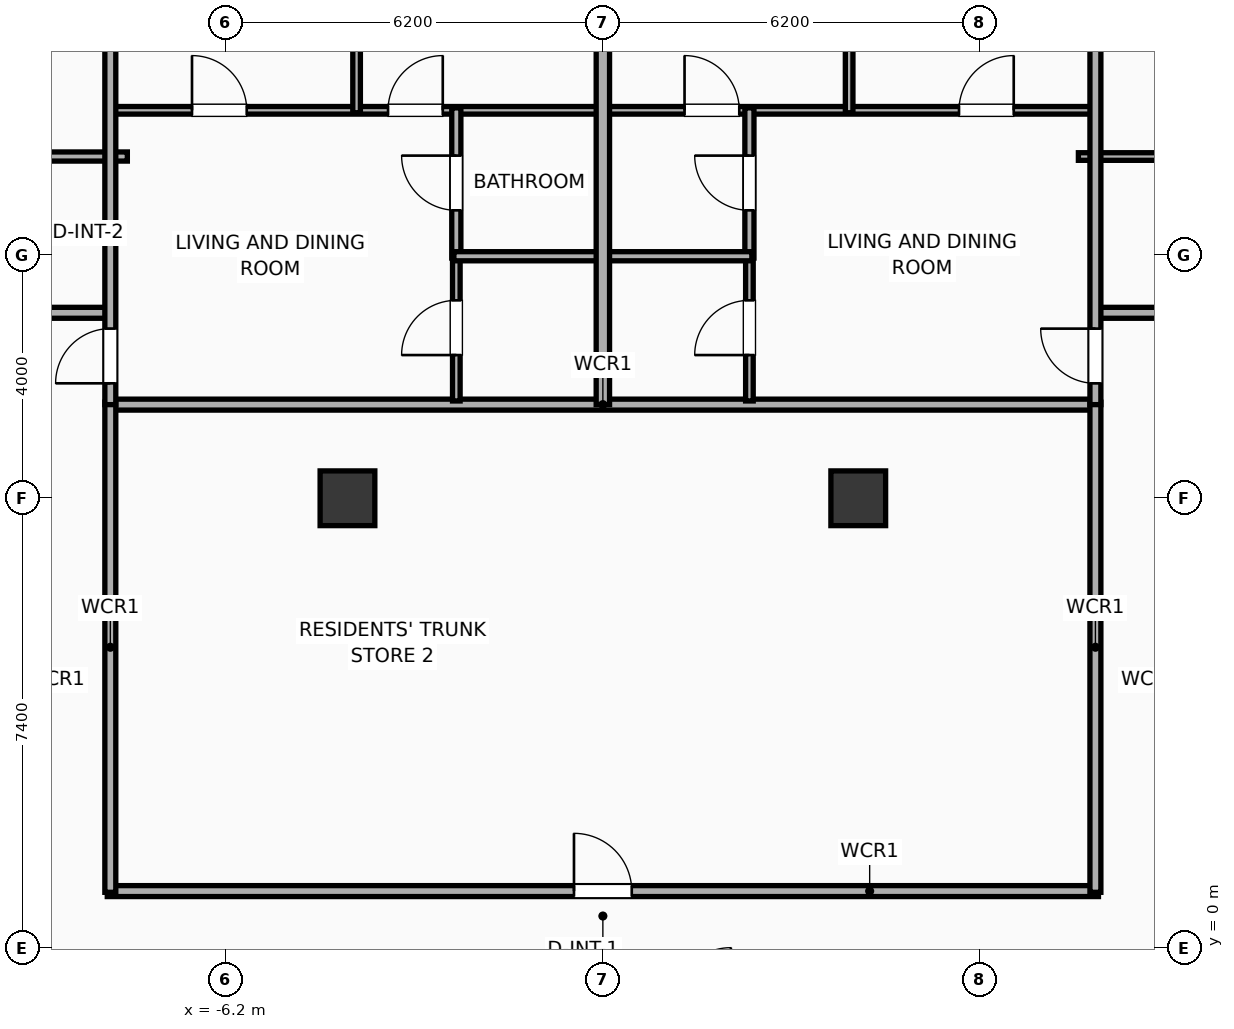
"""IFC4 building model, lengths in metres.
Left out: names, types, materials, properties, quantities, classifications, styles, units other than length and angle.
Written with IfcOpenShell. Run it as: python <this file> out.ifc"""

import sys

from ifc_helpers import new_model, si_unit, direction, frame, frame_2d, origin, origin_2d, place, context, subcontext, project, spatial, rectangle, extrude, element, fill, save


model = new_model("IFC4")
c1 = context("Model", 3, precision=1e-05, world=origin(), true_north=direction((0.0, 1.0)))
c2 = subcontext(c1, "Body", "Model", "MODEL_VIEW")
j1 = project(units=[si_unit("LENGTHUNIT", "METRE"), si_unit("PLANEANGLEUNIT", "RADIAN")], contexts=[c1])
p1 = place(None, origin())
s1 = spatial("IfcSite", under=j1, at=p1, CompositionType="ELEMENT")
p2 = place(p1, origin())
s2 = spatial("IfcBuilding", under=s1, at=p2, CompositionType="ELEMENT")
p3 = place(p2, frame((0.0, 0.0, 163.8)))
s3 = spatial("IfcBuildingStorey", under=s2, at=p3, CompositionType="ELEMENT", Elevation=163.8)
for number, where, z_axis, x_axis in (
    (1, (-4.2, 7.4, 0.0), (0.0, 0.0, 1.0), (1.0, 0.0, 0.0)),
    (2, (4.2, 7.4, 0.0), (0.0, 0.0, 1.0), (1.0, 0.0, 0.0)),
):
    element("IfcColumn", number, at=place(p3, frame(where, z_axis=z_axis, x_axis=x_axis)), inside=s3, PredefinedType="COLUMN", context=c2, shape_type="SweptSolid", body=[
        extrude(rectangle(XDim=0.9, YDim=0.9, at=origin_2d()), origin(), (0.0, 0.0, 1.0), 3.9),
    ])
p4 = place(p3, frame((-8.15, 8.94, 0.0), z_axis=(0.0, 0.0, 1.0), x_axis=(1.0, 0.0, 0.0)))
e3 = element("IfcWall", 3, at=p4, inside=s3, PredefinedType="PARTITIONING", context=c2, shape_type="SweptSolid", body=[
    extrude(rectangle(XDim=16.3, YDim=0.18, at=frame_2d((8.15, 0.0))), origin(), (0.0, 0.0, 1.0), 3.65),
])
p5 = place(p3, frame((-8.15, 0.94, 0.0), z_axis=(0.0, 0.0, 1.0), x_axis=(1.0, 0.0, 0.0)))
e4 = element("IfcWall", 4, at=p5, inside=s3, PredefinedType="PARTITIONING", context=c2, shape_type="SweptSolid", body=[
    extrude(rectangle(XDim=16.3, YDim=0.18, at=frame_2d((8.15, 0.0))), origin(), (0.0, 0.0, 1.0), 3.65),
])
p6 = place(p5, frame((7.675, 0.0, 0.0)))
e5 = element("IfcOpeningElement", 5, at=p6, cuts=e4, PredefinedType="OPENING", context=c2, shape_type="SweptSolid", body=[
    extrude(rectangle(XDim=0.95, YDim=2.05, at=frame_2d((0.475, 1.025))), frame((0.0, 0.1, 0.0), z_axis=(0.0, -1.0, 0.0), x_axis=(1.0, 0.0, 0.0)), (0.0, 0.0, 1.0), 0.2),
])
for number, where, z_axis, x_axis in (
    (6, (-8.1, 0.92, 0.0), (0.0, 0.0, 1.0), (0.0, 1.0, 0.0)),
    (7, (8.1, 0.92, 0.0), (0.0, 0.0, 1.0), (0.0, 1.0, 0.0)),
):
    element("IfcWall", number, at=place(p3, frame(where, z_axis=z_axis, x_axis=x_axis)), inside=s3, PredefinedType="PARTITIONING", context=c2, shape_type="SweptSolid", body=[
        extrude(rectangle(XDim=8.06, YDim=0.18, at=frame_2d((4.03, 0.0))), origin(), (0.0, 0.0, 1.0), 3.65),
    ])
p7 = place(p3, frame((-10.126, 13.02, 0.0), z_axis=(0.0, 0.0, 1.0), x_axis=(1.0, 0.0, 0.0)))
e8 = element("IfcWall", 8, at=p7, inside=s3, PredefinedType="PLUMBINGWALL", context=c2, shape_type="SweptSolid", body=[
    extrude(rectangle(XDim=2.306, YDim=0.15, at=frame_2d((1.153, 0.0))), origin(), (0.0, 0.0, 1.0), 3.65),
])
p8 = place(p3, frame((7.82, 13.02, 0.0), z_axis=(0.0, 0.0, 1.0), x_axis=(1.0, 0.0, 0.0)))
e9 = element("IfcWall", 9, at=p8, inside=s3, PredefinedType="PARTITIONING", context=c2, shape_type="SweptSolid", body=[
    extrude(rectangle(XDim=2.63, YDim=0.125, at=frame_2d((1.315, 0.0))), origin(), (0.0, 0.0, 1.0), 3.65),
])
p9 = place(p3, frame((-19.75, 10.45, 0.0), z_axis=(0.0, 0.0, 1.0), x_axis=(1.0, 0.0, 0.0)))
e10 = element("IfcWall", 10, at=p9, inside=s3, PredefinedType="PARTITIONING", context=c2, shape_type="SweptSolid", body=[
    extrude(rectangle(XDim=11.67, YDim=0.18, at=frame_2d((5.835, 0.0))), origin(), (0.0, 0.0, 1.0), 3.65),
])
p10 = place(p9, frame((3.553, 0.0, 0.0)))
e11 = element("IfcOpeningElement", 11, at=p10, cuts=e10, PredefinedType="OPENING", context=c2, shape_type="SweptSolid", body=[
    extrude(rectangle(XDim=1.15, YDim=2.05, at=frame_2d((0.575, 1.025))), frame((0.0, 0.1, 0.0), z_axis=(0.0, -1.0, 0.0), x_axis=(1.0, 0.0, 0.0)), (0.0, 0.0, 1.0), 0.2),
])
p11 = place(p9, frame((8.489, 0.0, 0.0)))
e12 = element("IfcOpeningElement", 12, at=p11, cuts=e10, PredefinedType="OPENING", context=c2, shape_type="SweptSolid", body=[
    extrude(rectangle(XDim=0.9, YDim=2.05, at=frame_2d((0.45, 1.025))), frame((0.0, 0.1, 0.0), z_axis=(0.0, -1.0, 0.0), x_axis=(1.0, 0.0, 0.0)), (0.0, 0.0, 1.0), 0.2),
])
p12 = place(p3, frame((8.08, 10.45, 0.0), z_axis=(0.0, 0.0, 1.0), x_axis=(1.0, 0.0, 0.0)))
e13 = element("IfcWall", 13, at=p12, inside=s3, PredefinedType="PARTITIONING", context=c2, shape_type="SweptSolid", body=[
    extrude(rectangle(XDim=11.67, YDim=0.18, at=frame_2d((5.835, 0.0))), origin(), (0.0, 0.0, 1.0), 3.65),
])
p13 = place(p12, frame((2.604, 0.0, 0.0)))
e14 = element("IfcOpeningElement", 14, at=p13, cuts=e13, PredefinedType="OPENING", context=c2, shape_type="SweptSolid", body=[
    extrude(rectangle(XDim=0.9, YDim=2.05, at=frame_2d((0.45, 1.025))), frame((0.0, 0.1, 0.0), z_axis=(0.0, -1.0, 0.0), x_axis=(1.0, 0.0, 0.0)), (0.0, 0.0, 1.0), 0.2),
])
p14 = place(p12, frame((7.016, 0.0, 0.0)))
e15 = element("IfcOpeningElement", 15, at=p14, cuts=e13, PredefinedType="OPENING", context=c2, shape_type="SweptSolid", body=[
    extrude(rectangle(XDim=1.15, YDim=2.05, at=frame_2d((0.575, 1.025))), frame((0.0, 0.1, 0.0), z_axis=(0.0, -1.0, 0.0), x_axis=(1.0, 0.0, 0.0)), (0.0, 0.0, 1.0), 0.2),
])
p15 = place(p3, frame((-8.08, 13.78, 0.0), z_axis=(0.0, 0.0, 1.0), x_axis=(1.0, 0.0, 0.0)))
e16 = element("IfcWall", 16, at=p15, inside=s3, PredefinedType="PARTITIONING", context=c2, shape_type="SweptSolid", body=[
    extrude(rectangle(XDim=8.06, YDim=0.125, at=frame_2d((4.03, 0.0))), origin(), (0.0, 0.0, 1.0), 3.65),
])
p16 = place(p15, frame((1.323, 0.0, 0.0)))
e17 = element("IfcOpeningElement", 17, at=p16, cuts=e16, PredefinedType="OPENING", context=c2, shape_type="SweptSolid", body=[
    extrude(rectangle(XDim=0.9, YDim=2.05, at=frame_2d((0.45, 1.025))), frame((0.0, 0.073, 0.0), z_axis=(0.0, -1.0, 0.0), x_axis=(1.0, 0.0, 0.0)), (0.0, 0.0, 1.0), 0.145),
])
p17 = place(p15, frame((4.547, 0.0, 0.0)))
e18 = element("IfcOpeningElement", 18, at=p17, cuts=e16, PredefinedType="OPENING", context=c2, shape_type="SweptSolid", body=[
    extrude(rectangle(XDim=0.9, YDim=2.05, at=frame_2d((0.45, 1.025))), frame((0.0, 0.073, 0.0), z_axis=(0.0, -1.0, 0.0), x_axis=(1.0, 0.0, 0.0)), (0.0, 0.0, 1.0), 0.145),
])
p18 = place(p3, frame((-2.41, 9.0, 0.0), z_axis=(0.0, 0.0, 1.0), x_axis=(0.0, 1.0, 0.0)))
e19 = element("IfcWall", 19, at=p18, inside=s3, PredefinedType="PARTITIONING", context=c2, shape_type="SweptSolid", body=[
    extrude(rectangle(XDim=2.41, YDim=0.125, at=frame_2d((1.205, 0.0))), origin(), (0.0, 0.0, 1.0), 3.65),
])
p19 = place(p18, frame((0.755, 0.0, 0.0)))
e20 = element("IfcOpeningElement", 20, at=p19, cuts=e19, PredefinedType="OPENING", context=c2, shape_type="SweptSolid", body=[
    extrude(rectangle(XDim=0.9, YDim=2.05, at=frame_2d((0.45, 1.025))), frame((0.0, 0.073, 0.0), z_axis=(0.0, -1.0, 0.0), x_axis=(1.0, 0.0, 0.0)), (0.0, 0.0, 1.0), 0.145),
])
p20 = place(p3, frame((-2.41, 11.35, 0.0), z_axis=(0.0, 0.0, 1.0), x_axis=(0.0, 1.0, 0.0)))
e21 = element("IfcWall", 21, at=p20, inside=s3, PredefinedType="PLUMBINGWALL", context=c2, shape_type="SweptSolid", body=[
    extrude(rectangle(XDim=2.47, YDim=0.15, at=frame_2d((1.235, 0.0))), origin(), (0.0, 0.0, 1.0), 3.04),
])
p21 = place(p20, frame((0.785, 0.0, 0.0)))
e22 = element("IfcOpeningElement", 22, at=p21, cuts=e21, PredefinedType="OPENING", context=c2, shape_type="SweptSolid", body=[
    extrude(rectangle(XDim=0.9, YDim=2.05, at=frame_2d((0.45, 1.025))), frame((0.0, 0.085, 0.0), z_axis=(0.0, -1.0, 0.0), x_axis=(1.0, 0.0, 0.0)), (0.0, 0.0, 1.0), 0.17),
])
p22 = place(p3, frame((-2.45, 11.38, 0.0), z_axis=(0.0, 0.0, 1.0), x_axis=(1.0, 0.0, 0.0)))
e23 = element("IfcWall", 23, at=p22, inside=s3, PredefinedType="PLUMBINGWALL", context=c2, shape_type="SweptSolid", body=[
    extrude(rectangle(XDim=2.43, YDim=0.15, at=frame_2d((1.215, 0.0))), origin(), (0.0, 0.0, 1.0), 3.65),
])
p23 = place(p3, frame((-4.05, 13.74, 0.0), z_axis=(0.0, 0.0, 1.0), x_axis=(0.0, 1.0, 0.0)))
e24 = element("IfcWall", 24, at=p23, inside=s3, PredefinedType="PARTITIONING", context=c2, shape_type="SweptSolid", body=[
    extrude(rectangle(XDim=5.912, YDim=0.125, at=frame_2d((2.956, 0.0))), origin(), (0.0, 0.0, 1.0), 3.65),
])
p24 = place(p3, frame((-8.1, 8.94, 0.0), z_axis=(0.0, 0.0, 1.0), x_axis=(0.0, 1.0, 0.0)))
e25 = element("IfcWall", 25, at=p24, inside=s3, PredefinedType="PARTITIONING", context=c2, shape_type="SweptSolid", body=[
    extrude(rectangle(XDim=10.286, YDim=0.18, at=frame_2d((5.143, 0.0))), origin(), (0.0, 0.0, 1.0), 3.65),
])
p25 = place(p24, frame((0.35, 0.0, 0.0)))
e26 = element("IfcOpeningElement", 26, at=p25, cuts=e25, PredefinedType="OPENING", context=c2, shape_type="SweptSolid", body=[
    extrude(rectangle(XDim=0.9, YDim=2.05, at=frame_2d((0.45, 1.025))), frame((0.0, 0.1, 0.0), z_axis=(0.0, -1.0, 0.0), x_axis=(1.0, 0.0, 0.0)), (0.0, 0.0, 1.0), 0.2),
])
p26 = place(p3, frame((0.02, 13.78, 0.0), z_axis=(0.0, 0.0, 1.0), x_axis=(1.0, 0.0, 0.0)))
e27 = element("IfcWall", 27, at=p26, inside=s3, PredefinedType="PARTITIONING", context=c2, shape_type="SweptSolid", body=[
    extrude(rectangle(XDim=8.06, YDim=0.125, at=frame_2d((4.03, 0.0))), origin(), (0.0, 0.0, 1.0), 3.65),
])
p27 = place(p26, frame((1.323, 0.0, 0.0)))
e28 = element("IfcOpeningElement", 28, at=p27, cuts=e27, PredefinedType="OPENING", context=c2, shape_type="SweptSolid", body=[
    extrude(rectangle(XDim=0.9, YDim=2.05, at=frame_2d((0.45, 1.025))), frame((0.0, 0.073, 0.0), z_axis=(0.0, -1.0, 0.0), x_axis=(1.0, 0.0, 0.0)), (0.0, 0.0, 1.0), 0.145),
])
p28 = place(p26, frame((5.837, 0.0, 0.0)))
e29 = element("IfcOpeningElement", 29, at=p28, cuts=e27, PredefinedType="OPENING", context=c2, shape_type="SweptSolid", body=[
    extrude(rectangle(XDim=0.9, YDim=2.05, at=frame_2d((0.45, 1.025))), frame((0.0, 0.073, 0.0), z_axis=(0.0, -1.0, 0.0), x_axis=(1.0, 0.0, 0.0)), (0.0, 0.0, 1.0), 0.145),
])
p29 = place(p3, frame((2.41, 9.0, 0.0), z_axis=(0.0, 0.0, 1.0), x_axis=(0.0, 1.0, 0.0)))
e30 = element("IfcWall", 30, at=p29, inside=s3, PredefinedType="PARTITIONING", context=c2, shape_type="SweptSolid", body=[
    extrude(rectangle(XDim=2.41, YDim=0.125, at=frame_2d((1.205, 0.0))), origin(), (0.0, 0.0, 1.0), 3.65),
])
p30 = place(p29, frame((0.755, 0.0, 0.0)))
e31 = element("IfcOpeningElement", 31, at=p30, cuts=e30, PredefinedType="OPENING", context=c2, shape_type="SweptSolid", body=[
    extrude(rectangle(XDim=0.9, YDim=2.05, at=frame_2d((0.45, 1.025))), frame((0.0, 0.073, 0.0), z_axis=(0.0, -1.0, 0.0), x_axis=(1.0, 0.0, 0.0)), (0.0, 0.0, 1.0), 0.145),
])
p31 = place(p3, frame((2.41, 11.35, 0.0), z_axis=(0.0, 0.0, 1.0), x_axis=(0.0, 1.0, 0.0)))
e32 = element("IfcWall", 32, at=p31, inside=s3, PredefinedType="PLUMBINGWALL", context=c2, shape_type="SweptSolid", body=[
    extrude(rectangle(XDim=2.47, YDim=0.15, at=frame_2d((1.235, 0.0))), origin(), (0.0, 0.0, 1.0), 3.65),
])
p32 = place(p31, frame((0.785, 0.0, 0.0)))
e33 = element("IfcOpeningElement", 33, at=p32, cuts=e32, PredefinedType="OPENING", context=c2, shape_type="SweptSolid", body=[
    extrude(rectangle(XDim=0.9, YDim=2.05, at=frame_2d((0.45, 1.025))), frame((0.0, 0.085, 0.0), z_axis=(0.0, -1.0, 0.0), x_axis=(1.0, 0.0, 0.0)), (0.0, 0.0, 1.0), 0.17),
])
p33 = place(p3, frame((0.02, 11.38, 0.0), z_axis=(0.0, 0.0, 1.0), x_axis=(1.0, 0.0, 0.0)))
e34 = element("IfcWall", 34, at=p33, inside=s3, PredefinedType="PLUMBINGWALL", context=c2, shape_type="SweptSolid", body=[
    extrude(rectangle(XDim=2.43, YDim=0.15, at=frame_2d((1.215, 0.0))), origin(), (0.0, 0.0, 1.0), 3.65),
])
p34 = place(p3, frame((4.05, 13.74, 0.0), z_axis=(0.0, 0.0, 1.0), x_axis=(0.0, 1.0, 0.0)))
e35 = element("IfcWall", 35, at=p34, inside=s3, PredefinedType="PARTITIONING", context=c2, shape_type="SweptSolid", body=[
    extrude(rectangle(XDim=6.763, YDim=0.125, at=frame_2d((3.382, 0.0))), origin(), (0.0, 0.0, 1.0), 3.65),
])
p35 = place(p3, frame((8.1, 8.94, 0.0), z_axis=(0.0, 0.0, 1.0), x_axis=(0.0, 1.0, 0.0)))
e36 = element("IfcWall", 36, at=p35, inside=s3, PredefinedType="PARTITIONING", context=c2, shape_type="SweptSolid", body=[
    extrude(rectangle(XDim=11.989, YDim=0.18, at=frame_2d((5.995, 0.0))), origin(), (0.0, 0.0, 1.0), 3.65),
])
p36 = place(p35, frame((0.35, 0.0, 0.0)))
e37 = element("IfcOpeningElement", 37, at=p36, cuts=e36, PredefinedType="OPENING", context=c2, shape_type="SweptSolid", body=[
    extrude(rectangle(XDim=0.9, YDim=2.05, at=frame_2d((0.45, 1.025))), frame((0.0, 0.1, 0.0), z_axis=(0.0, -1.0, 0.0), x_axis=(1.0, 0.0, 0.0)), (0.0, 0.0, 1.0), 0.2),
])
p37 = place(p3, frame((0.0, 8.94, 0.0), z_axis=(0.0, 0.0, 1.0), x_axis=(0.0, 1.0, 0.0)))
e38 = element("IfcWall", 38, at=p37, inside=s3, PredefinedType="PARTITIONING", context=c2, shape_type="SweptSolid", body=[
    extrude(rectangle(XDim=11.138, YDim=0.22, at=frame_2d((5.569, 0.0))), origin(), (0.0, 0.0, 1.0), 3.04),
])
p38 = place(p6, origin())
e39 = element("IfcDoor", 39, at=p38, inside=s3, OperationType="SINGLE_SWING_LEFT", PredefinedType="DOOR", context=c2, shape_type="SweptSolid", body=[
    extrude(rectangle(XDim=0.95, YDim=2.05, at=frame_2d((0.475, 1.025))), frame((0.0, 0.025, 0.0), z_axis=(0.0, -1.0, 0.0), x_axis=(1.0, 0.0, 0.0)), (0.0, 0.0, 1.0), 0.05),
])
fill(e5, e39)
p39 = place(p16, origin())
e40 = element("IfcDoor", 40, at=p39, inside=s3, OperationType="SINGLE_SWING_LEFT", PredefinedType="DOOR", context=c2, shape_type="SweptSolid", body=[
    extrude(rectangle(XDim=0.9, YDim=2.05, at=frame_2d((0.45, 1.025))), frame((0.0, 0.025, 0.0), z_axis=(0.0, -1.0, 0.0), x_axis=(1.0, 0.0, 0.0)), (0.0, 0.0, 1.0), 0.05),
])
fill(e17, e40)
p40 = place(p17, origin())
e41 = element("IfcDoor", 41, at=p40, inside=s3, OperationType="SINGLE_SWING_RIGHT", PredefinedType="DOOR", context=c2, shape_type="SweptSolid", body=[
    extrude(rectangle(XDim=0.9, YDim=2.05, at=frame_2d((0.45, 1.025))), frame((0.0, 0.025, 0.0), z_axis=(0.0, -1.0, 0.0), x_axis=(1.0, 0.0, 0.0)), (0.0, 0.0, 1.0), 0.05),
])
fill(e18, e41)
p41 = place(p19, origin())
e42 = element("IfcDoor", 42, at=p41, inside=s3, OperationType="SINGLE_SWING_LEFT", PredefinedType="DOOR", context=c2, shape_type="SweptSolid", body=[
    extrude(rectangle(XDim=0.9, YDim=2.05, at=frame_2d((0.45, 1.025))), frame((0.0, 0.025, 0.0), z_axis=(0.0, -1.0, 0.0), x_axis=(1.0, 0.0, 0.0)), (0.0, 0.0, 1.0), 0.05),
])
fill(e20, e42)
p42 = place(p21, origin())
e43 = element("IfcDoor", 43, at=p42, inside=s3, OperationType="SINGLE_SWING_RIGHT", PredefinedType="DOOR", context=c2, shape_type="SweptSolid", body=[
    extrude(rectangle(XDim=0.9, YDim=2.05, at=frame_2d((0.45, 1.025))), frame((0.0, 0.025, 0.0), z_axis=(0.0, -1.0, 0.0), x_axis=(1.0, 0.0, 0.0)), (0.0, 0.0, 1.0), 0.05),
])
fill(e22, e43)
p43 = place(p25, origin())
e44 = element("IfcDoor", 44, at=p43, inside=s3, OperationType="SINGLE_SWING_LEFT", PredefinedType="DOOR", context=c2, shape_type="SweptSolid", body=[
    extrude(rectangle(XDim=0.9, YDim=2.05, at=frame_2d((0.45, 1.025))), frame((0.0, 0.025, 0.0), z_axis=(0.0, -1.0, 0.0), x_axis=(1.0, 0.0, 0.0)), (0.0, 0.0, 1.0), 0.05),
])
fill(e26, e44)
p44 = place(p27, origin())
e45 = element("IfcDoor", 45, at=p44, inside=s3, OperationType="SINGLE_SWING_LEFT", PredefinedType="DOOR", context=c2, shape_type="SweptSolid", body=[
    extrude(rectangle(XDim=0.9, YDim=2.05, at=frame_2d((0.45, 1.025))), frame((0.0, 0.025, 0.0), z_axis=(0.0, -1.0, 0.0), x_axis=(1.0, 0.0, 0.0)), (0.0, 0.0, 1.0), 0.05),
])
fill(e28, e45)
p45 = place(p28, origin())
e46 = element("IfcDoor", 46, at=p45, inside=s3, OperationType="SINGLE_SWING_RIGHT", PredefinedType="DOOR", context=c2, shape_type="SweptSolid", body=[
    extrude(rectangle(XDim=0.9, YDim=2.05, at=frame_2d((0.45, 1.025))), frame((0.0, 0.025, 0.0), z_axis=(0.0, -1.0, 0.0), x_axis=(1.0, 0.0, 0.0)), (0.0, 0.0, 1.0), 0.05),
])
fill(e29, e46)
p46 = place(p30, origin())
e47 = element("IfcDoor", 47, at=p46, inside=s3, OperationType="SINGLE_SWING_LEFT", PredefinedType="DOOR", context=c2, shape_type="SweptSolid", body=[
    extrude(rectangle(XDim=0.9, YDim=2.05, at=frame_2d((0.45, 1.025))), frame((0.0, 0.025, 0.0), z_axis=(0.0, -1.0, 0.0), x_axis=(1.0, 0.0, 0.0)), (0.0, 0.0, 1.0), 0.05),
])
fill(e31, e47)
p47 = place(p32, origin())
e48 = element("IfcDoor", 48, at=p47, inside=s3, OperationType="SINGLE_SWING_RIGHT", PredefinedType="DOOR", context=c2, shape_type="SweptSolid", body=[
    extrude(rectangle(XDim=0.9, YDim=2.05, at=frame_2d((0.45, 1.025))), frame((0.0, 0.025, 0.0), z_axis=(0.0, -1.0, 0.0), x_axis=(1.0, 0.0, 0.0)), (0.0, 0.0, 1.0), 0.05),
])
fill(e33, e48)
p48 = place(p36, origin())
e49 = element("IfcDoor", 49, at=p48, inside=s3, OperationType="SINGLE_SWING_RIGHT", PredefinedType="DOOR", context=c2, shape_type="SweptSolid", body=[
    extrude(rectangle(XDim=0.9, YDim=2.05, at=frame_2d((0.45, 1.025))), frame((0.0, 0.025, 0.0), z_axis=(0.0, -1.0, 0.0), x_axis=(1.0, 0.0, 0.0)), (0.0, 0.0, 1.0), 0.05),
])
fill(e37, e49)
save(model, sys.argv[1])
